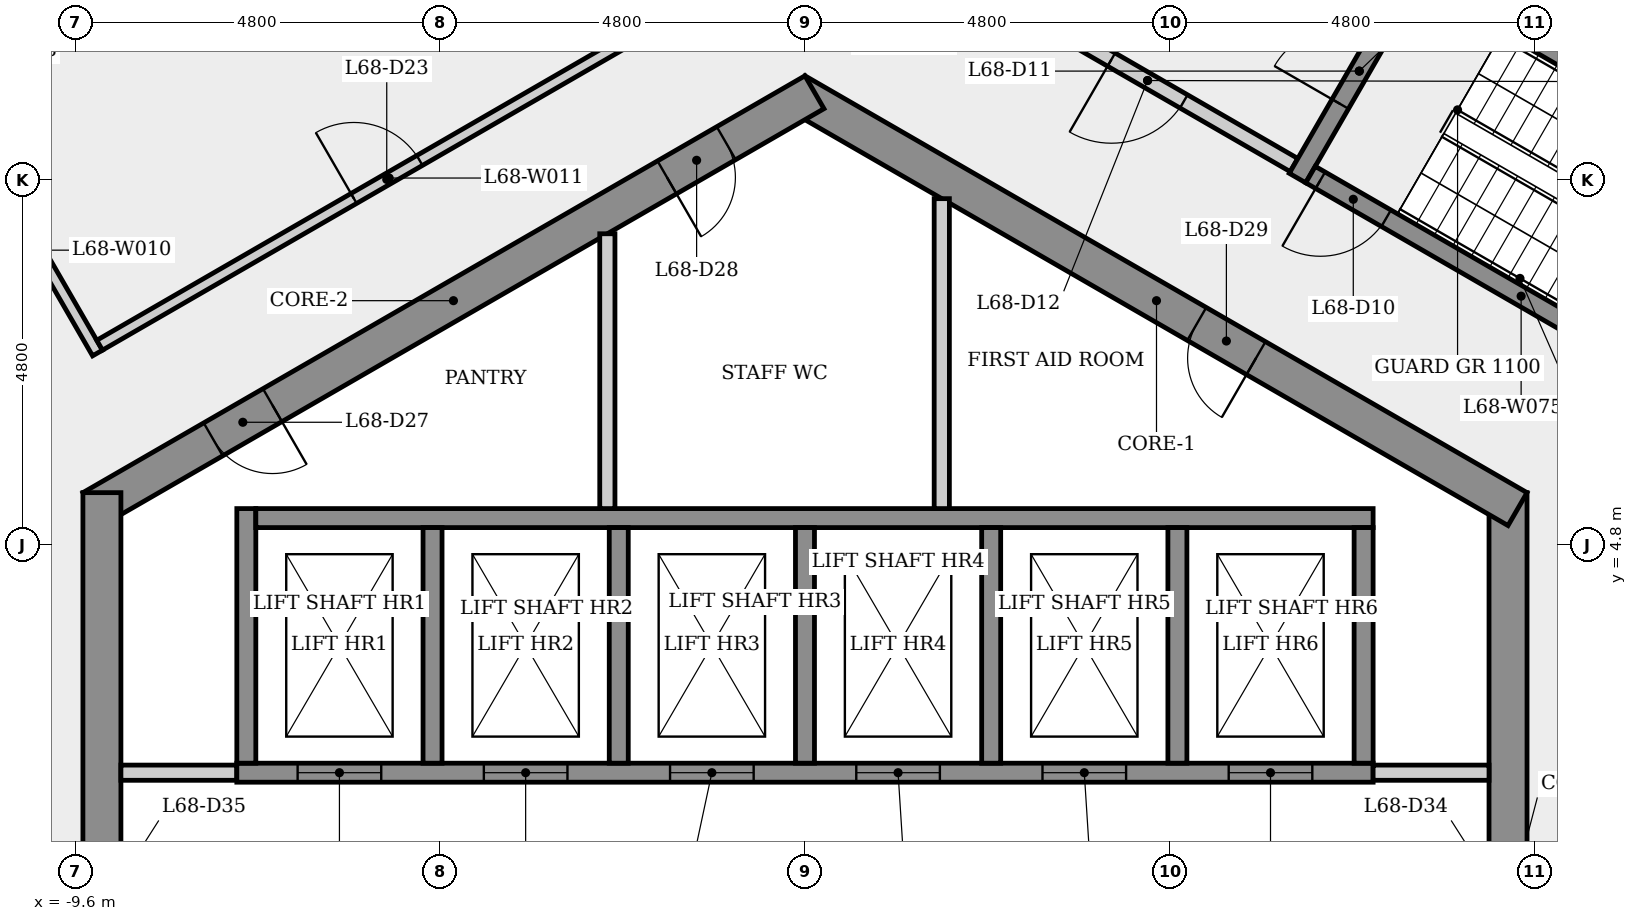
"""IFC4 building model, lengths in metres.
Left out: names, types, materials, properties, quantities, classifications, styles, units other than length and angle.
Written with IfcOpenShell. Run it as: python <this file> out.ifc"""

import sys

from ifc_helpers import new_model, si_unit, direction, frame, frame_2d, origin, place, context, subcontext, project, spatial, rectangle, extrude, element, fill, save


model = new_model("IFC4")
c1 = context("Model", 3, precision=1e-05, world=origin(), true_north=direction((0.0, 1.0)))
c2 = subcontext(c1, "Body", "Model", "MODEL_VIEW")
j1 = project(units=[si_unit("LENGTHUNIT", "METRE"), si_unit("PLANEANGLEUNIT", "RADIAN")], contexts=[c1])
p1 = place(None, origin())
s1 = spatial("IfcSite", under=j1, at=p1, CompositionType="ELEMENT")
p2 = place(p1, origin())
s2 = spatial("IfcBuilding", under=s1, at=p2, CompositionType="ELEMENT")
p3 = place(p2, frame((0.0, 0.0, 252.9)))
s3 = spatial("IfcBuildingStorey", under=s2, at=p3, CompositionType="ELEMENT", Elevation=252.9)
p4 = place(p3, frame((9.25, -5.485, 0.0), z_axis=(0.0, 0.0, 1.0), x_axis=(0.0, 1.0, 0.0)))
e1 = element("IfcWall", 1, at=p4, inside=s3, PredefinedType="SHEAR", context=c2, shape_type="SweptSolid", body=[
    extrude(rectangle(XDim=10.97, YDim=0.5, at=frame_2d((5.485, 0.0))), origin(), (0.0, 0.0, 1.0), 5.0),
])
p5 = place(p4, frame((4.685, 0.0, 0.0)))
e2 = element("IfcOpeningElement", 2, at=p5, cuts=e1, PredefinedType="OPENING", context=c2, shape_type="SweptSolid", body=[
    extrude(rectangle(XDim=1.6, YDim=2.1, at=frame_2d((0.8, 1.05))), frame((0.0, 0.26, 0.0), z_axis=(0.0, -1.0, 0.0), x_axis=(1.0, 0.0, 0.0)), (0.0, 0.0, 1.0), 0.52),
])
p6 = place(p3, frame((9.375, 5.268, 0.0), z_axis=(0.0, 0.0, 1.0), x_axis=(-0.866023993627, 0.500002442456, 0.0)))
e3 = element("IfcWall", 3, at=p6, inside=s3, PredefinedType="SHEAR", context=c2, shape_type="SweptSolid", body=[
    extrude(rectangle(XDim=10.97, YDim=0.5, at=frame_2d((5.485, 0.0))), origin(), (0.0, 0.0, 1.0), 5.0),
])
p7 = place(p6, frame((3.973, 0.0, 0.0)))
e4 = element("IfcOpeningElement", 4, at=p7, cuts=e3, PredefinedType="OPENING", context=c2, shape_type="SweptSolid", body=[
    extrude(rectangle(XDim=0.9, YDim=2.1, at=frame_2d((0.45, 1.05))), frame((0.0, 0.26, 0.0), z_axis=(0.0, -1.0, 0.0), x_axis=(1.0, 0.0, 0.0)), (0.0, 0.0, 1.0), 0.52),
])
p8 = place(p3, frame((0.125, 10.753, 0.0), z_axis=(0.0, 0.0, 1.0), x_axis=(-0.866023993627, -0.500002442456, 0.0)))
e5 = element("IfcWall", 5, at=p8, inside=s3, PredefinedType="SHEAR", context=c2, shape_type="SweptSolid", body=[
    extrude(rectangle(XDim=10.97, YDim=0.5, at=frame_2d((5.485, 0.0))), origin(), (0.0, 0.0, 1.0), 5.0),
])
p9 = place(p8, frame((8.235, 0.0, 0.0)))
e6 = element("IfcOpeningElement", 6, at=p9, cuts=e5, PredefinedType="OPENING", context=c2, shape_type="SweptSolid", body=[
    extrude(rectangle(XDim=0.9, YDim=2.1, at=frame_2d((0.45, 1.05))), frame((0.0, 0.26, 0.0), z_axis=(0.0, -1.0, 0.0), x_axis=(1.0, 0.0, 0.0)), (0.0, 0.0, 1.0), 0.52),
])
p10 = place(p8, frame((1.34, 0.0, 0.0)))
e7 = element("IfcOpeningElement", 7, at=p10, cuts=e5, PredefinedType="OPENING", context=c2, shape_type="SweptSolid", body=[
    extrude(rectangle(XDim=0.9, YDim=2.1, at=frame_2d((0.45, 1.05))), frame((0.0, 0.26, 0.0), z_axis=(0.0, -1.0, 0.0), x_axis=(1.0, 0.0, 0.0)), (0.0, 0.0, 1.0), 0.52),
])
p11 = place(p3, frame((-9.25, 5.485, 0.0), z_axis=(0.0, 0.0, 1.0), x_axis=(0.0, -1.0, 0.0)))
e8 = element("IfcWall", 8, at=p11, inside=s3, PredefinedType="SHEAR", context=c2, shape_type="SweptSolid", body=[
    extrude(rectangle(XDim=10.97, YDim=0.5, at=frame_2d((5.485, 0.0))), origin(), (0.0, 0.0, 1.0), 5.0),
])
p12 = place(p11, frame((8.51, 0.0, 0.0)))
e9 = element("IfcOpeningElement", 9, at=p12, cuts=e8, PredefinedType="OPENING", context=c2, shape_type="SweptSolid", body=[
    extrude(rectangle(XDim=0.9, YDim=2.1, at=frame_2d((0.45, 1.05))), frame((0.0, 0.26, 0.0), z_axis=(0.0, -1.0, 0.0), x_axis=(1.0, 0.0, 0.0)), (0.0, 0.0, 1.0), 0.52),
])
p13 = place(p11, frame((4.685, 0.0, 0.0)))
e10 = element("IfcOpeningElement", 10, at=p13, cuts=e8, PredefinedType="OPENING", context=c2, shape_type="SweptSolid", body=[
    extrude(rectangle(XDim=1.6, YDim=2.1, at=frame_2d((0.8, 1.05))), frame((0.0, 0.26, 0.0), z_axis=(0.0, -1.0, 0.0), x_axis=(1.0, 0.0, 0.0)), (0.0, 0.0, 1.0), 0.52),
])
p14 = place(p3, frame((-10.87, 10.029, 0.0), z_axis=(0.0, 0.0, 1.0), x_axis=(0.499995170647, -0.866028191995, 0.0)))
e11 = element("IfcWall", 11, at=p14, inside=s3, PredefinedType="PARTITIONING", context=c2, shape_type="SweptSolid", body=[
    extrude(rectangle(XDim=3.125, YDim=0.15, at=frame_2d((1.563, 0.0))), origin(), (0.0, 0.0, 1.0), 4.6),
])
p15 = place(p3, frame((-9.28, 7.425, 0.0), z_axis=(0.0, 0.0, 1.0), x_axis=(0.866023408847, 0.500003455318, 0.0)))
e12 = element("IfcWall", 12, at=p15, inside=s3, PredefinedType="PARTITIONING", context=c2, shape_type="SweptSolid", body=[
    extrude(rectangle(XDim=8.799, YDim=0.15, at=frame_2d((4.4, 0.0))), origin(), (0.0, 0.0, 1.0), 4.6),
])
p16 = place(p15, frame((3.862, 0.0, 0.0)))
e13 = element("IfcOpeningElement", 13, at=p16, cuts=e12, PredefinedType="OPENING", context=c2, shape_type="SweptSolid", body=[
    extrude(rectangle(XDim=1.0, YDim=2.1, at=frame_2d((0.5, 1.05))), frame((0.0, 0.085, 0.0), z_axis=(0.0, -1.0, 0.0), x_axis=(1.0, 0.0, 0.0)), (0.0, 0.0, 1.0), 0.17),
])
p17 = place(p3, frame((-9.0, 1.8, 0.0), z_axis=(0.0, 0.0, 1.0), x_axis=(1.0, 0.0, 0.0)))
e14 = element("IfcWall", 14, at=p17, inside=s3, PredefinedType="PARTITIONING", context=c2, shape_type="SweptSolid", body=[
    extrude(rectangle(XDim=1.525, YDim=0.2, at=frame_2d((0.763, 0.0))), origin(), (0.0, 0.0, 1.0), 4.6),
])
p18 = place(p3, frame((-7.475, 1.8, 0.0), z_axis=(0.0, 0.0, 1.0), x_axis=(1.0, 0.0, 0.0)))
e15 = element("IfcWall", 15, at=p18, inside=s3, PredefinedType="SHEAR", context=c2, shape_type="SweptSolid", body=[
    extrude(rectangle(XDim=14.95, YDim=0.25, at=frame_2d((7.475, 0.0))), origin(), (0.0, 0.0, 1.0), 4.6),
])
p19 = place(p18, frame((0.8, 0.0, 0.0)))
e16 = element("IfcOpeningElement", 16, at=p19, cuts=e15, PredefinedType="OPENING", context=c2, shape_type="SweptSolid", body=[
    extrude(rectangle(XDim=1.1, YDim=2.1, at=frame_2d((0.55, 1.05))), frame((0.0, 0.135, 0.0), z_axis=(0.0, -1.0, 0.0), x_axis=(1.0, 0.0, 0.0)), (0.0, 0.0, 1.0), 0.27),
])
p20 = place(p18, frame((3.25, 0.0, 0.0)))
e17 = element("IfcOpeningElement", 17, at=p20, cuts=e15, PredefinedType="OPENING", context=c2, shape_type="SweptSolid", body=[
    extrude(rectangle(XDim=1.1, YDim=2.1, at=frame_2d((0.55, 1.05))), frame((0.0, 0.135, 0.0), z_axis=(0.0, -1.0, 0.0), x_axis=(1.0, 0.0, 0.0)), (0.0, 0.0, 1.0), 0.27),
])
p21 = place(p18, frame((5.7, 0.0, 0.0)))
e18 = element("IfcOpeningElement", 18, at=p21, cuts=e15, PredefinedType="OPENING", context=c2, shape_type="SweptSolid", body=[
    extrude(rectangle(XDim=1.1, YDim=2.1, at=frame_2d((0.55, 1.05))), frame((0.0, 0.135, 0.0), z_axis=(0.0, -1.0, 0.0), x_axis=(1.0, 0.0, 0.0)), (0.0, 0.0, 1.0), 0.27),
])
p22 = place(p18, frame((8.15, 0.0, 0.0)))
e19 = element("IfcOpeningElement", 19, at=p22, cuts=e15, PredefinedType="OPENING", context=c2, shape_type="SweptSolid", body=[
    extrude(rectangle(XDim=1.1, YDim=2.1, at=frame_2d((0.55, 1.05))), frame((0.0, 0.135, 0.0), z_axis=(0.0, -1.0, 0.0), x_axis=(1.0, 0.0, 0.0)), (0.0, 0.0, 1.0), 0.27),
])
p23 = place(p18, frame((10.6, 0.0, 0.0)))
e20 = element("IfcOpeningElement", 20, at=p23, cuts=e15, PredefinedType="OPENING", context=c2, shape_type="SweptSolid", body=[
    extrude(rectangle(XDim=1.1, YDim=2.1, at=frame_2d((0.55, 1.05))), frame((0.0, 0.135, 0.0), z_axis=(0.0, -1.0, 0.0), x_axis=(1.0, 0.0, 0.0)), (0.0, 0.0, 1.0), 0.27),
])
p24 = place(p18, frame((13.05, 0.0, 0.0)))
e21 = element("IfcOpeningElement", 21, at=p24, cuts=e15, PredefinedType="OPENING", context=c2, shape_type="SweptSolid", body=[
    extrude(rectangle(XDim=1.1, YDim=2.1, at=frame_2d((0.55, 1.05))), frame((0.0, 0.135, 0.0), z_axis=(0.0, -1.0, 0.0), x_axis=(1.0, 0.0, 0.0)), (0.0, 0.0, 1.0), 0.27),
])
p25 = place(p3, frame((-7.35, 1.925, 0.0), z_axis=(0.0, 0.0, 1.0), x_axis=(0.0, 1.0, 0.0)))
e22 = element("IfcWall", 22, at=p25, inside=s3, PredefinedType="SHEAR", context=c2, shape_type="SweptSolid", body=[
    extrude(rectangle(XDim=3.35, YDim=0.25, at=frame_2d((1.675, 0.0))), origin(), (0.0, 0.0, 1.0), 4.6),
])
p26 = place(p3, frame((-7.225, 5.15, 0.0), z_axis=(0.0, 0.0, 1.0), x_axis=(1.0, 0.0, 0.0)))
e23 = element("IfcWall", 23, at=p26, inside=s3, PredefinedType="SHEAR", context=c2, shape_type="SweptSolid", body=[
    extrude(rectangle(XDim=14.7, YDim=0.25, at=frame_2d((7.35, 0.0))), origin(), (0.0, 0.0, 1.0), 4.6),
])
p27 = place(p3, frame((-4.9, 5.025, 0.0), z_axis=(0.0, 0.0, 1.0), x_axis=(0.0, -1.0, 0.0)))
e24 = element("IfcWall", 24, at=p27, inside=s3, PredefinedType="SHEAR", context=c2, shape_type="SweptSolid", body=[
    extrude(rectangle(XDim=3.1, YDim=0.25, at=frame_2d((1.55, 0.0))), origin(), (0.0, 0.0, 1.0), 5.0),
])
p28 = place(p3, frame((-2.6, 8.891, 0.0), z_axis=(0.0, 0.0, 1.0), x_axis=(0.0, -1.0, 0.0)))
e25 = element("IfcWall", 25, at=p28, inside=s3, PredefinedType="PARTITIONING", context=c2, shape_type="SweptSolid", body=[
    extrude(rectangle(XDim=3.616, YDim=0.2, at=frame_2d((1.808, 0.0))), origin(), (0.0, 0.0, 1.0), 4.6),
])
for number, where, z_axis, x_axis in (
    (26, (-2.45, 5.025, 0.0), (0.0, 0.0, 1.0), (0.0, -1.0, 0.0)),
    (27, (0.0, 5.025, 0.0), (0.0, 0.0, 1.0), (0.0, -1.0, 0.0)),
):
    element("IfcWall", number, at=place(p3, frame(where, z_axis=z_axis, x_axis=x_axis)), inside=s3, PredefinedType="SHEAR", context=c2, shape_type="SweptSolid", body=[
        extrude(rectangle(XDim=3.1, YDim=0.25, at=frame_2d((1.55, 0.0))), origin(), (0.0, 0.0, 1.0), 5.0),
    ])
p29 = place(p3, frame((1.8, 9.353, 0.0), z_axis=(0.0, 0.0, 1.0), x_axis=(0.0, -1.0, 0.0)))
e28 = element("IfcWall", 28, at=p29, inside=s3, PredefinedType="PARTITIONING", context=c2, shape_type="SweptSolid", body=[
    extrude(rectangle(XDim=4.078, YDim=0.2, at=frame_2d((2.039, 0.0))), origin(), (0.0, 0.0, 1.0), 4.6),
])
for number, where, z_axis, x_axis in (
    (29, (2.45, 5.025, 0.0), (0.0, 0.0, 1.0), (0.0, -1.0, 0.0)),
    (30, (4.9, 5.025, 0.0), (0.0, 0.0, 1.0), (0.0, -1.0, 0.0)),
):
    element("IfcWall", number, at=place(p3, frame(where, z_axis=z_axis, x_axis=x_axis)), inside=s3, PredefinedType="SHEAR", context=c2, shape_type="SweptSolid", body=[
        extrude(rectangle(XDim=3.1, YDim=0.25, at=frame_2d((1.55, 0.0))), origin(), (0.0, 0.0, 1.0), 5.0),
    ])
p30 = place(p3, frame((6.435, 9.795, 0.0), z_axis=(0.0, 0.0, 1.0), x_axis=(-0.866012907634, 0.500021643343, 0.0)))
e31 = element("IfcWall", 31, at=p30, inside=s3, PredefinedType="PARTITIONING", context=c2, shape_type="SweptSolid", body=[
    extrude(rectangle(XDim=4.45, YDim=0.2, at=frame_2d((2.225, 0.0))), origin(), (0.0, 0.0, 1.0), 4.6),
])
p31 = place(p30, frame((1.675, 0.0, 0.0)))
e32 = element("IfcOpeningElement", 32, at=p31, cuts=e31, PredefinedType="OPENING", context=c2, shape_type="SweptSolid", body=[
    extrude(rectangle(XDim=1.1, YDim=2.1, at=frame_2d((0.55, 1.05))), frame((0.0, 0.11, 0.0), z_axis=(0.0, -1.0, 0.0), x_axis=(1.0, 0.0, 0.0)), (0.0, 0.0, 1.0), 0.22),
])
p32 = place(p3, frame((6.48, 9.624, 0.0), z_axis=(0.0, 0.0, 1.0), x_axis=(0.500017246033, 0.866015446554, 0.0)))
e33 = element("IfcWall", 33, at=p32, inside=s3, PredefinedType="SHEAR", context=c2, shape_type="SweptSolid", body=[
    extrude(rectangle(XDim=3.25, YDim=0.25, at=frame_2d((1.625, 0.0))), origin(), (0.0, 0.0, 1.0), 4.6),
])
p33 = place(p32, frame((1.125, 0.0, 0.0)))
e34 = element("IfcOpeningElement", 34, at=p33, cuts=e33, PredefinedType="OPENING", context=c2, shape_type="SweptSolid", body=[
    extrude(rectangle(XDim=1.0, YDim=2.1, at=frame_2d((0.5, 1.05))), frame((0.0, 0.135, 0.0), z_axis=(0.0, -1.0, 0.0), x_axis=(1.0, 0.0, 0.0)), (0.0, 0.0, 1.0), 0.27),
])
p34 = place(p3, frame((7.475, 1.8, 0.0), z_axis=(0.0, 0.0, 1.0), x_axis=(1.0, 0.0, 0.0)))
e35 = element("IfcWall", 35, at=p34, inside=s3, PredefinedType="PARTITIONING", context=c2, shape_type="SweptSolid", body=[
    extrude(rectangle(XDim=1.525, YDim=0.2, at=frame_2d((0.763, 0.0))), origin(), (0.0, 0.0, 1.0), 4.6),
])
p35 = place(p3, frame((7.35, 5.025, 0.0), z_axis=(0.0, 0.0, 1.0), x_axis=(0.0, -1.0, 0.0)))
e36 = element("IfcWall", 36, at=p35, inside=s3, PredefinedType="SHEAR", context=c2, shape_type="SweptSolid", body=[
    extrude(rectangle(XDim=3.1, YDim=0.25, at=frame_2d((1.55, 0.0))), origin(), (0.0, 0.0, 1.0), 5.0),
])
p36 = place(p3, frame((8.151, 12.268, 0.0), z_axis=(0.0, 0.0, 1.0), x_axis=(0.866025499775, -0.499999833739, 0.0)))
e37 = element("IfcWall", 37, at=p36, inside=s3, PredefinedType="SHEAR", context=c2, shape_type="SweptSolid", body=[
    extrude(rectangle(XDim=6.4, YDim=0.25, at=frame_2d((3.2, 0.0))), origin(), (0.0, 0.0, 1.0), 4.6),
])
p37 = place(p3, frame((12.194, 6.47, 0.0), z_axis=(0.0, 0.0, 1.0), x_axis=(-0.866025499775, 0.499999833739, 0.0)))
e38 = element("IfcWall", 38, at=p37, inside=s3, PredefinedType="SHEAR", context=c2, shape_type="SweptSolid", body=[
    extrude(rectangle(XDim=6.4, YDim=0.25, at=frame_2d((3.2, 0.0))), origin(), (0.0, 0.0, 1.0), 4.6),
])
p38 = place(p37, frame((5.25, 0.0, 0.0)))
e39 = element("IfcOpeningElement", 39, at=p38, cuts=e38, PredefinedType="OPENING", context=c2, shape_type="SweptSolid", body=[
    extrude(rectangle(XDim=1.0, YDim=2.1, at=frame_2d((0.5, 1.05))), frame((0.0, 0.135, 0.0), z_axis=(0.0, -1.0, 0.0), x_axis=(1.0, 0.0, 0.0)), (0.0, 0.0, 1.0), 0.27),
])
p39 = place(p19, origin())
e40 = element("IfcDoor", 40, at=p39, inside=s3, OperationType="SLIDING_TO_LEFT", PredefinedType="DOOR", context=c2, shape_type="SweptSolid", body=[
    extrude(rectangle(XDim=1.1, YDim=2.1, at=frame_2d((0.55, 1.05))), frame((0.0, 0.025, 0.0), z_axis=(0.0, -1.0, 0.0), x_axis=(1.0, 0.0, 0.0)), (0.0, 0.0, 1.0), 0.05),
])
fill(e16, e40)
p40 = place(p20, origin())
e41 = element("IfcDoor", 41, at=p40, inside=s3, OperationType="SLIDING_TO_LEFT", PredefinedType="DOOR", context=c2, shape_type="SweptSolid", body=[
    extrude(rectangle(XDim=1.1, YDim=2.1, at=frame_2d((0.55, 1.05))), frame((0.0, 0.025, 0.0), z_axis=(0.0, -1.0, 0.0), x_axis=(1.0, 0.0, 0.0)), (0.0, 0.0, 1.0), 0.05),
])
fill(e17, e41)
p41 = place(p21, origin())
e42 = element("IfcDoor", 42, at=p41, inside=s3, OperationType="SLIDING_TO_LEFT", PredefinedType="DOOR", context=c2, shape_type="SweptSolid", body=[
    extrude(rectangle(XDim=1.1, YDim=2.1, at=frame_2d((0.55, 1.05))), frame((0.0, 0.025, 0.0), z_axis=(0.0, -1.0, 0.0), x_axis=(1.0, 0.0, 0.0)), (0.0, 0.0, 1.0), 0.05),
])
fill(e18, e42)
p42 = place(p22, origin())
e43 = element("IfcDoor", 43, at=p42, inside=s3, OperationType="SLIDING_TO_LEFT", PredefinedType="DOOR", context=c2, shape_type="SweptSolid", body=[
    extrude(rectangle(XDim=1.1, YDim=2.1, at=frame_2d((0.55, 1.05))), frame((0.0, 0.025, 0.0), z_axis=(0.0, -1.0, 0.0), x_axis=(1.0, 0.0, 0.0)), (0.0, 0.0, 1.0), 0.05),
])
fill(e19, e43)
p43 = place(p23, origin())
e44 = element("IfcDoor", 44, at=p43, inside=s3, OperationType="SLIDING_TO_LEFT", PredefinedType="DOOR", context=c2, shape_type="SweptSolid", body=[
    extrude(rectangle(XDim=1.1, YDim=2.1, at=frame_2d((0.55, 1.05))), frame((0.0, 0.025, 0.0), z_axis=(0.0, -1.0, 0.0), x_axis=(1.0, 0.0, 0.0)), (0.0, 0.0, 1.0), 0.05),
])
fill(e20, e44)
p44 = place(p24, origin())
e45 = element("IfcDoor", 45, at=p44, inside=s3, OperationType="SLIDING_TO_LEFT", PredefinedType="DOOR", context=c2, shape_type="SweptSolid", body=[
    extrude(rectangle(XDim=1.1, YDim=2.1, at=frame_2d((0.55, 1.05))), frame((0.0, 0.025, 0.0), z_axis=(0.0, -1.0, 0.0), x_axis=(1.0, 0.0, 0.0)), (0.0, 0.0, 1.0), 0.05),
])
fill(e21, e45)
p45 = place(p38, origin())
e46 = element("IfcDoor", 46, at=p45, inside=s3, OperationType="SINGLE_SWING_RIGHT", PredefinedType="DOOR", context=c2, shape_type="SweptSolid", body=[
    extrude(rectangle(XDim=1.0, YDim=2.1, at=frame_2d((0.5, 1.05))), frame((0.0, 0.025, 0.0), z_axis=(0.0, -1.0, 0.0), x_axis=(1.0, 0.0, 0.0)), (0.0, 0.0, 1.0), 0.05),
])
fill(e39, e46)
p46 = place(p33, origin())
e47 = element("IfcDoor", 47, at=p46, inside=s3, OperationType="SINGLE_SWING_LEFT", PredefinedType="DOOR", context=c2, shape_type="SweptSolid", body=[
    extrude(rectangle(XDim=1.0, YDim=2.1, at=frame_2d((0.5, 1.05))), frame((0.0, 0.025, 0.0), z_axis=(0.0, -1.0, 0.0), x_axis=(1.0, 0.0, 0.0)), (0.0, 0.0, 1.0), 0.05),
])
fill(e34, e47)
p47 = place(p31, origin())
e48 = element("IfcDoor", 48, at=p47, inside=s3, OperationType="SINGLE_SWING_RIGHT", PredefinedType="DOOR", context=c2, shape_type="SweptSolid", body=[
    extrude(rectangle(XDim=1.1, YDim=2.1, at=frame_2d((0.55, 1.05))), frame((0.0, 0.025, 0.0), z_axis=(0.0, -1.0, 0.0), x_axis=(1.0, 0.0, 0.0)), (0.0, 0.0, 1.0), 0.05),
])
fill(e32, e48)
p48 = place(p16, origin())
e49 = element("IfcDoor", 49, at=p48, inside=s3, OperationType="SINGLE_SWING_LEFT", PredefinedType="DOOR", context=c2, shape_type="SweptSolid", body=[
    extrude(rectangle(XDim=1.0, YDim=2.1, at=frame_2d((0.5, 1.05))), frame((0.0, 0.025, 0.0), z_axis=(0.0, -1.0, 0.0), x_axis=(1.0, 0.0, 0.0)), (0.0, 0.0, 1.0), 0.05),
])
fill(e13, e49)
p49 = place(p9, origin())
e50 = element("IfcDoor", 50, at=p49, inside=s3, OperationType="SINGLE_SWING_LEFT", PredefinedType="DOOR", context=c2, shape_type="SweptSolid", body=[
    extrude(rectangle(XDim=0.9, YDim=2.1, at=frame_2d((0.45, 1.05))), frame((0.0, 0.025, 0.0), z_axis=(0.0, -1.0, 0.0), x_axis=(1.0, 0.0, 0.0)), (0.0, 0.0, 1.0), 0.05),
])
fill(e6, e50)
p50 = place(p10, origin())
e51 = element("IfcDoor", 51, at=p50, inside=s3, OperationType="SINGLE_SWING_RIGHT", PredefinedType="DOOR", context=c2, shape_type="SweptSolid", body=[
    extrude(rectangle(XDim=0.9, YDim=2.1, at=frame_2d((0.45, 1.05))), frame((0.0, 0.025, 0.0), z_axis=(0.0, -1.0, 0.0), x_axis=(1.0, 0.0, 0.0)), (0.0, 0.0, 1.0), 0.05),
])
fill(e7, e51)
p51 = place(p7, origin())
e52 = element("IfcDoor", 52, at=p51, inside=s3, OperationType="SINGLE_SWING_LEFT", PredefinedType="DOOR", context=c2, shape_type="SweptSolid", body=[
    extrude(rectangle(XDim=0.9, YDim=2.1, at=frame_2d((0.45, 1.05))), frame((0.0, 0.025, 0.0), z_axis=(0.0, -1.0, 0.0), x_axis=(1.0, 0.0, 0.0)), (0.0, 0.0, 1.0), 0.05),
])
fill(e4, e52)
save(model, sys.argv[1])
